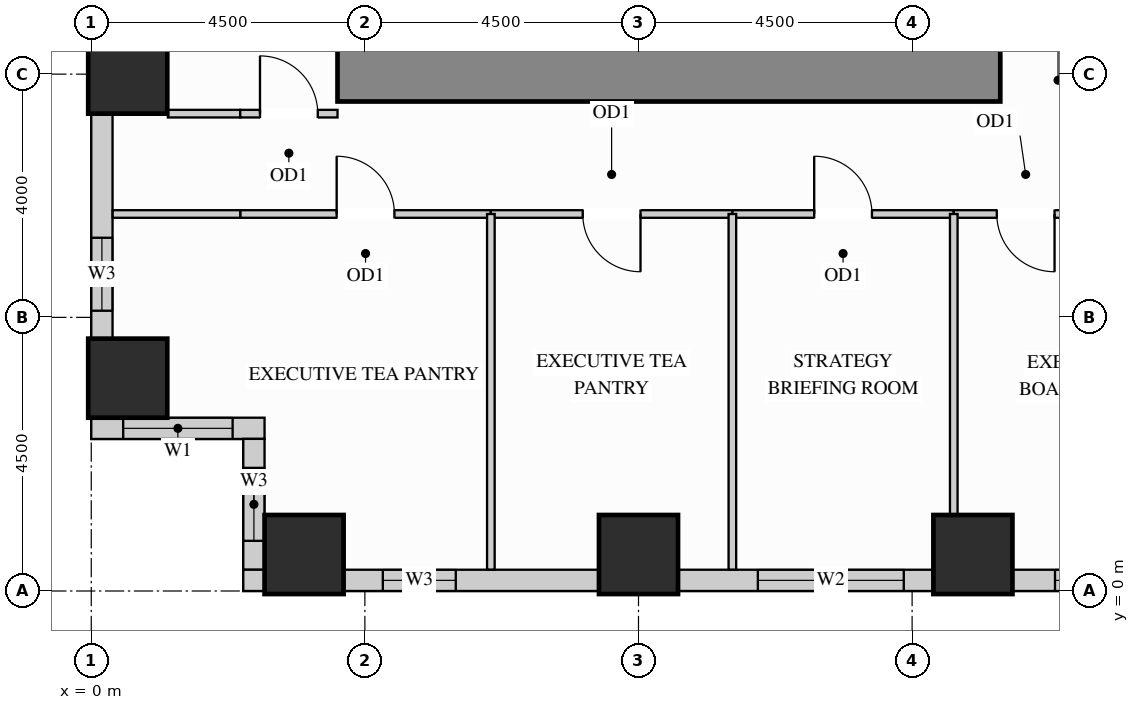
"""IFC4 building model, lengths in metres.
Left out: names, types, materials, properties, quantities, classifications, styles, units other than length and angle.
Written with IfcOpenShell. Run it as: python <this file> out.ifc"""

import sys

from ifc_helpers import new_model, si_unit, direction, frame, frame_2d, origin, origin_2d, place, context, subcontext, project, spatial, rectangle, extrude, source, transform, mapped, element, fill, save


model = new_model("IFC4")
c1 = context("Model", 3, precision=1e-05, world=origin(), true_north=direction((0.0, 1.0)))
c2 = subcontext(c1, "Body", "Model", "MODEL_VIEW")
j1 = project(units=[si_unit("LENGTHUNIT", "METRE"), si_unit("PLANEANGLEUNIT", "RADIAN")], contexts=[c1])
p1 = place(None, origin())
s1 = spatial("IfcSite", under=j1, at=p1, CompositionType="ELEMENT")
p2 = place(p1, origin())
s2 = spatial("IfcBuilding", under=s1, at=p2, CompositionType="ELEMENT")
p3 = place(p2, frame((0.0, 0.0, 29.7)))
s3 = spatial("IfcBuildingStorey", under=s2, at=p3, CompositionType="ELEMENT", Elevation=29.7)
m1 = source(origin(), c2, "Body", "SweptSolid", [
    extrude(rectangle(XDim=1.3, YDim=1.3, at=origin_2d()), origin(), (0.0, 0.0, 1.0), 3.38),
])
for number, where, z_axis, x_axis in (
    (1, (14.5, 0.6, 0.0), (0.0, 0.0, 1.0), (1.0, 0.0, 0.0)),
    (2, (3.5, 0.6, 0.0), (0.0, 0.0, 1.0), (1.0, 0.0, 0.0)),
    (3, (9.0, 0.6, 0.0), (0.0, 0.0, 1.0), (1.0, 0.0, 0.0)),
    (4, (0.6, 3.5, 0.0), (0.0, 0.0, 1.0), (1.0, 0.0, 0.0)),
    (5, (0.6, 8.5, 0.0), (0.0, 0.0, 1.0), (1.0, 0.0, 0.0)),
):
    element("IfcColumn", number, at=place(p3, frame(where, z_axis=z_axis, x_axis=x_axis)), inside=s3, PredefinedType="COLUMN", context=c2, shape_type="MappedRepresentation", body=[
        mapped(m1, transform((0.0, 0.0, 0.0), x_axis=(1.0, 0.0, 0.0), y_axis=(0.0, 1.0, 0.0), z_axis=(0.0, 0.0, 1.0))),
    ])
m2 = source(origin(), c2, "Body", "SweptSolid", [
    extrude(rectangle(XDim=10.9, YDim=0.9, at=frame_2d((5.45, 0.0))), origin(), (0.0, 0.0, 1.0), 3.38),
])
p4 = place(p3, frame((4.05, 8.5, 0.0), z_axis=(0.0, 0.0, 1.0), x_axis=(1.0, 0.0, 0.0)))
e6 = element("IfcWall", 6, at=p4, inside=s3, PredefinedType="SHEAR", context=c2, shape_type="MappedRepresentation", body=[
    mapped(m2, transform((0.0, 0.0, 0.0), x_axis=(1.0, 0.0, 0.0), y_axis=(0.0, 1.0, 0.0), z_axis=(0.0, 0.0, 1.0))),
])
p5 = place(p3, frame((0.175, 7.852, 0.0), z_axis=(0.0, 0.0, 1.0), x_axis=(0.0, -1.0, 0.0)))
e7 = element("IfcWall", 7, at=p5, inside=s3, PredefinedType="SOLIDWALL", context=c2, shape_type="SweptSolid", body=[
    extrude(rectangle(XDim=3.704, YDim=0.35, at=frame_2d((1.852, 0.0))), origin(), (0.0, 0.0, 1.0), 2.51),
])
p6 = place(p5, frame((2.043, 0.0, 0.78)))
e8 = element("IfcOpeningElement", 8, at=p6, cuts=e7, PredefinedType="OPENING", context=c2, shape_type="SweptSolid", body=[
    extrude(rectangle(XDim=1.2, YDim=1.55, at=frame_2d((0.6, 0.775))), frame((0.0, 0.185, 0.0), z_axis=(0.0, -1.0, 0.0), x_axis=(1.0, 0.0, 0.0)), (0.0, 0.0, 1.0), 0.37),
])
p7 = place(p3, frame((0.0, 2.675, 0.0), z_axis=(0.0, 0.0, 1.0), x_axis=(1.0, 0.0, 0.0)))
e9 = element("IfcWall", 9, at=p7, inside=s3, PredefinedType="SOLIDWALL", context=c2, shape_type="SweptSolid", body=[
    extrude(rectangle(XDim=2.85, YDim=0.35, at=frame_2d((1.425, 0.0))), origin(), (0.0, 0.0, 1.0), 3.365),
])
p8 = place(p7, frame((0.525, 0.0, 0.78)))
e10 = element("IfcOpeningElement", 10, at=p8, cuts=e9, PredefinedType="OPENING", context=c2, shape_type="SweptSolid", body=[
    extrude(rectangle(XDim=1.8, YDim=2.1, at=frame_2d((0.9, 1.05))), frame((0.0, 0.185, 0.0), z_axis=(0.0, -1.0, 0.0), x_axis=(1.0, 0.0, 0.0)), (0.0, 0.0, 1.0), 0.37),
])
p9 = place(p3, frame((2.675, 2.502, 0.0), z_axis=(0.0, 0.0, 1.0), x_axis=(0.0, -1.0, 0.0)))
e11 = element("IfcWall", 11, at=p9, inside=s3, PredefinedType="SOLIDWALL", context=c2, shape_type="SweptSolid", body=[
    extrude(rectangle(XDim=2.154, YDim=0.35, at=frame_2d((1.077, 0.0))), origin(), (0.0, 0.0, 1.0), 3.365),
])
p10 = place(p9, frame((0.477, 0.0, 0.78)))
e12 = element("IfcOpeningElement", 12, at=p10, cuts=e11, PredefinedType="OPENING", context=c2, shape_type="SweptSolid", body=[
    extrude(rectangle(XDim=1.2, YDim=2.1, at=frame_2d((0.6, 1.05))), frame((0.0, 0.185, 0.0), z_axis=(0.0, -1.0, 0.0), x_axis=(1.0, 0.0, 0.0)), (0.0, 0.0, 1.0), 0.37),
])
m3 = source(origin(), c2, "Body", "SweptSolid", [
    extrude(rectangle(XDim=0.352, YDim=0.35, at=frame_2d((0.176, 0.0))), origin(), (0.0, 0.0, 1.0), 3.365),
])
p11 = place(p3, frame((2.5, 0.175, 0.0), z_axis=(0.0, 0.0, 1.0), x_axis=(1.0, 0.0, 0.0)))
e13 = element("IfcWall", 13, at=p11, inside=s3, PredefinedType="SOLIDWALL", context=c2, shape_type="MappedRepresentation", body=[
    mapped(m3, transform((0.0, 0.0, 0.0), x_axis=(1.0, 0.0, 0.0), y_axis=(0.0, 1.0, 0.0), z_axis=(0.0, 0.0, 1.0))),
])
p12 = place(p3, frame((4.148, 0.175, 0.0), z_axis=(0.0, 0.0, 1.0), x_axis=(1.0, 0.0, 0.0)))
e14 = element("IfcWall", 14, at=p12, inside=s3, PredefinedType="SOLIDWALL", context=c2, shape_type="SweptSolid", body=[
    extrude(rectangle(XDim=4.204, YDim=0.35, at=frame_2d((2.102, 0.0))), origin(), (0.0, 0.0, 1.0), 2.51),
])
p13 = place(p12, frame((0.647, 0.0, 0.78)))
e15 = element("IfcOpeningElement", 15, at=p13, cuts=e14, PredefinedType="OPENING", context=c2, shape_type="SweptSolid", body=[
    extrude(rectangle(XDim=1.2, YDim=1.55, at=frame_2d((0.6, 0.775))), frame((0.0, 0.185, 0.0), z_axis=(0.0, -1.0, 0.0), x_axis=(1.0, 0.0, 0.0)), (0.0, 0.0, 1.0), 0.37),
])
p14 = place(p3, frame((9.648, 0.175, 0.0), z_axis=(0.0, 0.0, 1.0), x_axis=(1.0, 0.0, 0.0)))
e16 = element("IfcWall", 16, at=p14, inside=s3, PredefinedType="SOLIDWALL", context=c2, shape_type="SweptSolid", body=[
    extrude(rectangle(XDim=4.204, YDim=0.35, at=frame_2d((2.102, 0.0))), origin(), (0.0, 0.0, 1.0), 2.51),
])
p15 = place(p14, frame((1.315, 0.0, 0.78)))
e17 = element("IfcOpeningElement", 17, at=p15, cuts=e16, PredefinedType="OPENING", context=c2, shape_type="SweptSolid", body=[
    extrude(rectangle(XDim=2.4, YDim=1.55, at=frame_2d((1.2, 0.775))), frame((0.0, 0.185, 0.0), z_axis=(0.0, -1.0, 0.0), x_axis=(1.0, 0.0, 0.0)), (0.0, 0.0, 1.0), 0.37),
])
p16 = place(p3, frame((15.148, 0.175, 0.0), z_axis=(0.0, 0.0, 1.0), x_axis=(1.0, 0.0, 0.0)))
e18 = element("IfcWall", 18, at=p16, inside=s3, PredefinedType="SOLIDWALL", context=c2, shape_type="SweptSolid", body=[
    extrude(rectangle(XDim=3.204, YDim=0.35, at=frame_2d((1.602, 0.0))), origin(), (0.0, 0.0, 1.0), 2.51),
])
p17 = place(p16, frame((0.702, 0.0, 0.78)))
e19 = element("IfcOpeningElement", 19, at=p17, cuts=e18, PredefinedType="OPENING", context=c2, shape_type="SweptSolid", body=[
    extrude(rectangle(XDim=1.8, YDim=1.55, at=frame_2d((0.9, 0.775))), frame((0.0, 0.185, 0.0), z_axis=(0.0, -1.0, 0.0), x_axis=(1.0, 0.0, 0.0)), (0.0, 0.0, 1.0), 0.37),
])
m4 = source(origin(), c2, "Body", "SweptSolid", [
    extrude(rectangle(XDim=1.19, YDim=0.125, at=frame_2d((0.595, 0.0))), origin(), (0.0, 0.0, 1.0), 3.365),
])
p18 = place(p3, frame((1.26, 7.85, 0.0), z_axis=(0.0, 0.0, 1.0), x_axis=(1.0, 0.0, 0.0)))
e20 = element("IfcWall", 20, at=p18, inside=s3, PredefinedType="PARTITIONING", context=c2, shape_type="MappedRepresentation", body=[
    mapped(m4, transform((0.0, 0.0, 0.0), x_axis=(1.0, 0.0, 0.0), y_axis=(0.0, 1.0, 0.0), z_axis=(0.0, 0.0, 1.0))),
])
p19 = place(p3, frame((2.45, 7.85, 0.0), z_axis=(0.0, 0.0, 1.0), x_axis=(1.0, 0.0, 0.0)))
e21 = element("IfcWall", 21, at=p19, inside=s3, PredefinedType="PARTITIONING", context=c2, shape_type="SweptSolid", body=[
    extrude(rectangle(XDim=1.6, YDim=0.125, at=frame_2d((0.8, 0.0))), origin(), (0.0, 0.0, 1.0), 3.365),
])
p20 = place(p19, frame((0.325, 0.0, 0.0)))
e22 = element("IfcOpeningElement", 22, at=p20, cuts=e21, PredefinedType="OPENING", context=c2, shape_type="SweptSolid", body=[
    extrude(rectangle(XDim=0.95, YDim=2.15, at=frame_2d((0.475, 1.075))), frame((0.0, 0.073, 0.0), z_axis=(0.0, -1.0, 0.0), x_axis=(1.0, 0.0, 0.0)), (0.0, 0.0, 1.0), 0.145),
])
p21 = place(p3, frame((2.45, 6.2, 0.0), z_axis=(0.0, 0.0, 1.0), x_axis=(1.0, 0.0, 0.0)))
e23 = element("IfcWall", 23, at=p21, inside=s3, PredefinedType="PARTITIONING", context=c2, shape_type="SweptSolid", body=[
    extrude(rectangle(XDim=4.122, YDim=0.125, at=frame_2d((2.061, 0.0))), origin(), (0.0, 0.0, 1.0), 2.828),
])
p22 = place(p21, frame((1.586, 0.0, 0.0)))
e24 = element("IfcOpeningElement", 24, at=p22, cuts=e23, PredefinedType="OPENING", context=c2, shape_type="SweptSolid", body=[
    extrude(rectangle(XDim=0.95, YDim=2.15, at=frame_2d((0.475, 1.075))), frame((0.0, 0.073, 0.0), z_axis=(0.0, -1.0, 0.0), x_axis=(1.0, 0.0, 0.0)), (0.0, 0.0, 1.0), 0.145),
])
p23 = place(p3, frame((6.572, 6.2, 0.0), z_axis=(0.0, 0.0, 1.0), x_axis=(1.0, 0.0, 0.0)))
e25 = element("IfcWall", 25, at=p23, inside=s3, PredefinedType="PARTITIONING", context=c2, shape_type="SweptSolid", body=[
    extrude(rectangle(XDim=3.972, YDim=0.125, at=frame_2d((1.986, 0.0))), origin(), (0.0, 0.0, 1.0), 2.828),
])
p24 = place(p23, frame((1.511, 0.0, 0.0)))
e26 = element("IfcOpeningElement", 26, at=p24, cuts=e25, PredefinedType="OPENING", context=c2, shape_type="SweptSolid", body=[
    extrude(rectangle(XDim=0.95, YDim=2.15, at=frame_2d((0.475, 1.075))), frame((0.0, 0.073, 0.0), z_axis=(0.0, -1.0, 0.0), x_axis=(1.0, 0.0, 0.0)), (0.0, 0.0, 1.0), 0.145),
])
p25 = place(p3, frame((10.544, 6.2, 0.0), z_axis=(0.0, 0.0, 1.0), x_axis=(1.0, 0.0, 0.0)))
e27 = element("IfcWall", 27, at=p25, inside=s3, PredefinedType="PARTITIONING", context=c2, shape_type="SweptSolid", body=[
    extrude(rectangle(XDim=3.641, YDim=0.125, at=frame_2d((1.821, 0.0))), origin(), (0.0, 0.0, 1.0), 2.828),
])
p26 = place(p25, frame((1.345, 0.0, 0.0)))
e28 = element("IfcOpeningElement", 28, at=p26, cuts=e27, PredefinedType="OPENING", context=c2, shape_type="SweptSolid", body=[
    extrude(rectangle(XDim=0.95, YDim=2.15, at=frame_2d((0.475, 1.075))), frame((0.0, 0.073, 0.0), z_axis=(0.0, -1.0, 0.0), x_axis=(1.0, 0.0, 0.0)), (0.0, 0.0, 1.0), 0.145),
])
p27 = place(p3, frame((14.185, 6.2, 0.0), z_axis=(0.0, 0.0, 1.0), x_axis=(1.0, 0.0, 0.0)))
e29 = element("IfcWall", 29, at=p27, inside=s3, PredefinedType="PARTITIONING", context=c2, shape_type="SweptSolid", body=[
    extrude(rectangle(XDim=2.365, YDim=0.125, at=frame_2d((1.183, 0.0))), origin(), (0.0, 0.0, 1.0), 2.828),
])
p28 = place(p27, frame((0.708, 0.0, 0.0)))
e30 = element("IfcOpeningElement", 30, at=p28, cuts=e29, PredefinedType="OPENING", context=c2, shape_type="SweptSolid", body=[
    extrude(rectangle(XDim=0.95, YDim=2.15, at=frame_2d((0.475, 1.075))), frame((0.0, 0.073, 0.0), z_axis=(0.0, -1.0, 0.0), x_axis=(1.0, 0.0, 0.0)), (0.0, 0.0, 1.0), 0.145),
])
m5 = source(origin(), c2, "Body", "SweptSolid", [
    extrude(rectangle(XDim=2.098, YDim=0.125, at=frame_2d((1.049, 0.0))), origin(), (0.0, 0.0, 1.0), 2.828),
])
p29 = place(p3, frame((0.352, 6.2, 0.0), z_axis=(0.0, 0.0, 1.0), x_axis=(1.0, 0.0, 0.0)))
e31 = element("IfcWall", 31, at=p29, inside=s3, PredefinedType="PARTITIONING", context=c2, shape_type="MappedRepresentation", body=[
    mapped(m5, transform((0.0, 0.0, 0.0), x_axis=(1.0, 0.0, 0.0), y_axis=(0.0, 1.0, 0.0), z_axis=(0.0, 0.0, 1.0))),
])
m6 = source(origin(), c2, "Body", "SweptSolid", [
    extrude(rectangle(XDim=5.848, YDim=0.125, at=frame_2d((2.924, 0.0))), origin(), (0.0, 0.0, 1.0), 3.365),
])
for number, where, z_axis, x_axis in (
    (32, (6.572, 0.352, 0.0), (0.0, 0.0, 1.0), (0.0, 1.0, 0.0)),
    (33, (10.544, 0.352, 0.0), (0.0, 0.0, 1.0), (0.0, 1.0, 0.0)),
):
    element("IfcWall", number, at=place(p3, frame(where, z_axis=z_axis, x_axis=x_axis)), inside=s3, PredefinedType="PARTITIONING", context=c2, shape_type="MappedRepresentation", body=[
        mapped(m6, transform((0.0, 0.0, 0.0), x_axis=(1.0, 0.0, 0.0), y_axis=(0.0, 1.0, 0.0), z_axis=(0.0, 0.0, 1.0))),
    ])
m7 = source(origin(), c2, "Body", "SweptSolid", [
    extrude(rectangle(XDim=4.94, YDim=0.125, at=frame_2d((2.47, 0.0))), origin(), (0.0, 0.0, 1.0), 3.365),
])
p30 = place(p3, frame((14.185, 1.26, 0.0), z_axis=(0.0, 0.0, 1.0), x_axis=(0.0, 1.0, 0.0)))
e34 = element("IfcWall", 34, at=p30, inside=s3, PredefinedType="PARTITIONING", context=c2, shape_type="MappedRepresentation", body=[
    mapped(m7, transform((0.0, 0.0, 0.0), x_axis=(1.0, 0.0, 0.0), y_axis=(0.0, 1.0, 0.0), z_axis=(0.0, 0.0, 1.0))),
])
m8 = source(origin(), c2, "Body", "SweptSolid", [
    extrude(rectangle(XDim=0.95, YDim=2.15, at=frame_2d((0.475, 1.075))), frame((0.0, 0.025, 0.0), z_axis=(0.0, -1.0, 0.0), x_axis=(1.0, 0.0, 0.0)), (0.0, 0.0, 1.0), 0.05),
])
p31 = place(p22, origin())
e35 = element("IfcDoor", 35, at=p31, inside=s3, OperationType="SINGLE_SWING_LEFT", PredefinedType="DOOR", context=c2, shape_type="MappedRepresentation", body=[
    mapped(m8, transform((0.0, 0.0, 0.0), x_axis=(1.0, 0.0, 0.0), y_axis=(0.0, 1.0, 0.0), z_axis=(0.0, 0.0, 1.0))),
])
fill(e24, e35)
p32 = place(p24, origin())
e36 = element("IfcDoor", 36, at=p32, inside=s3, OperationType="SINGLE_SWING_RIGHT", PredefinedType="DOOR", context=c2, shape_type="MappedRepresentation", body=[
    mapped(m8, transform((0.0, 0.0, 0.0), x_axis=(1.0, 0.0, 0.0), y_axis=(0.0, 1.0, 0.0), z_axis=(0.0, 0.0, 1.0))),
])
fill(e26, e36)
p33 = place(p26, origin())
e37 = element("IfcDoor", 37, at=p33, inside=s3, OperationType="SINGLE_SWING_LEFT", PredefinedType="DOOR", context=c2, shape_type="MappedRepresentation", body=[
    mapped(m8, transform((0.0, 0.0, 0.0), x_axis=(1.0, 0.0, 0.0), y_axis=(0.0, 1.0, 0.0), z_axis=(0.0, 0.0, 1.0))),
])
fill(e28, e37)
p34 = place(p28, origin())
e38 = element("IfcDoor", 38, at=p34, inside=s3, OperationType="SINGLE_SWING_RIGHT", PredefinedType="DOOR", context=c2, shape_type="MappedRepresentation", body=[
    mapped(m8, transform((0.0, 0.0, 0.0), x_axis=(1.0, 0.0, 0.0), y_axis=(0.0, 1.0, 0.0), z_axis=(0.0, 0.0, 1.0))),
])
fill(e30, e38)
p35 = place(p20, origin())
e39 = element("IfcDoor", 39, at=p35, inside=s3, OperationType="SINGLE_SWING_LEFT", PredefinedType="DOOR", context=c2, shape_type="MappedRepresentation", body=[
    mapped(m8, transform((0.0, 0.0, 0.0), x_axis=(1.0, 0.0, 0.0), y_axis=(0.0, 1.0, 0.0), z_axis=(0.0, 0.0, 1.0))),
])
fill(e22, e39)
m9 = source(origin(), c2, "Body", "SweptSolid", [
    extrude(rectangle(XDim=1.8, YDim=2.1, at=frame_2d((0.9, 1.05))), frame((0.0, 0.03, 0.0), z_axis=(0.0, -1.0, 0.0), x_axis=(1.0, 0.0, 0.0)), (0.0, 0.0, 1.0), 0.06),
])
p36 = place(p8, origin())
e40 = element("IfcWindow", 40, at=p36, inside=s3, PartitioningType="SINGLE_PANEL", PredefinedType="WINDOW", context=c2, shape_type="MappedRepresentation", body=[
    mapped(m9, transform((0.0, 0.0, 0.0), x_axis=(1.0, 0.0, 0.0), y_axis=(0.0, 1.0, 0.0), z_axis=(0.0, 0.0, 1.0))),
])
fill(e10, e40)
m10 = source(origin(), c2, "Body", "SweptSolid", [
    extrude(rectangle(XDim=1.8, YDim=1.55, at=frame_2d((0.9, 0.775))), frame((0.0, 0.03, 0.0), z_axis=(0.0, -1.0, 0.0), x_axis=(1.0, 0.0, 0.0)), (0.0, 0.0, 1.0), 0.06),
])
p37 = place(p17, origin())
e41 = element("IfcWindow", 41, at=p37, inside=s3, PartitioningType="SINGLE_PANEL", PredefinedType="WINDOW", context=c2, shape_type="MappedRepresentation", body=[
    mapped(m10, transform((0.0, 0.0, 0.0), x_axis=(1.0, 0.0, 0.0), y_axis=(0.0, 1.0, 0.0), z_axis=(0.0, 0.0, 1.0))),
])
fill(e19, e41)
m11 = source(origin(), c2, "Body", "SweptSolid", [
    extrude(rectangle(XDim=2.4, YDim=1.55, at=frame_2d((1.2, 0.775))), frame((0.0, 0.03, 0.0), z_axis=(0.0, -1.0, 0.0), x_axis=(1.0, 0.0, 0.0)), (0.0, 0.0, 1.0), 0.06),
])
p38 = place(p15, origin())
e42 = element("IfcWindow", 42, at=p38, inside=s3, PartitioningType="SINGLE_PANEL", PredefinedType="WINDOW", context=c2, shape_type="MappedRepresentation", body=[
    mapped(m11, transform((0.0, 0.0, 0.0), x_axis=(1.0, 0.0, 0.0), y_axis=(0.0, 1.0, 0.0), z_axis=(0.0, 0.0, 1.0))),
])
fill(e17, e42)
m12 = source(origin(), c2, "Body", "SweptSolid", [
    extrude(rectangle(XDim=1.2, YDim=1.55, at=frame_2d((0.6, 0.775))), frame((0.0, 0.03, 0.0), z_axis=(0.0, -1.0, 0.0), x_axis=(1.0, 0.0, 0.0)), (0.0, 0.0, 1.0), 0.06),
])
p39 = place(p6, origin())
e43 = element("IfcWindow", 43, at=p39, inside=s3, PartitioningType="SINGLE_PANEL", PredefinedType="WINDOW", context=c2, shape_type="MappedRepresentation", body=[
    mapped(m12, transform((0.0, 0.0, 0.0), x_axis=(1.0, 0.0, 0.0), y_axis=(0.0, 1.0, 0.0), z_axis=(0.0, 0.0, 1.0))),
])
fill(e8, e43)
m13 = source(origin(), c2, "Body", "SweptSolid", [
    extrude(rectangle(XDim=1.2, YDim=2.1, at=frame_2d((0.6, 1.05))), frame((0.0, 0.03, 0.0), z_axis=(0.0, -1.0, 0.0), x_axis=(1.0, 0.0, 0.0)), (0.0, 0.0, 1.0), 0.06),
])
p40 = place(p10, origin())
e44 = element("IfcWindow", 44, at=p40, inside=s3, PartitioningType="SINGLE_PANEL", PredefinedType="WINDOW", context=c2, shape_type="MappedRepresentation", body=[
    mapped(m13, transform((0.0, 0.0, 0.0), x_axis=(1.0, 0.0, 0.0), y_axis=(0.0, 1.0, 0.0), z_axis=(0.0, 0.0, 1.0))),
])
fill(e12, e44)
p41 = place(p13, origin())
e45 = element("IfcWindow", 45, at=p41, inside=s3, PartitioningType="SINGLE_PANEL", PredefinedType="WINDOW", context=c2, shape_type="MappedRepresentation", body=[
    mapped(m12, transform((0.0, 0.0, 0.0), x_axis=(1.0, 0.0, 0.0), y_axis=(0.0, 1.0, 0.0), z_axis=(0.0, 0.0, 1.0))),
])
fill(e15, e45)
save(model, sys.argv[1])
